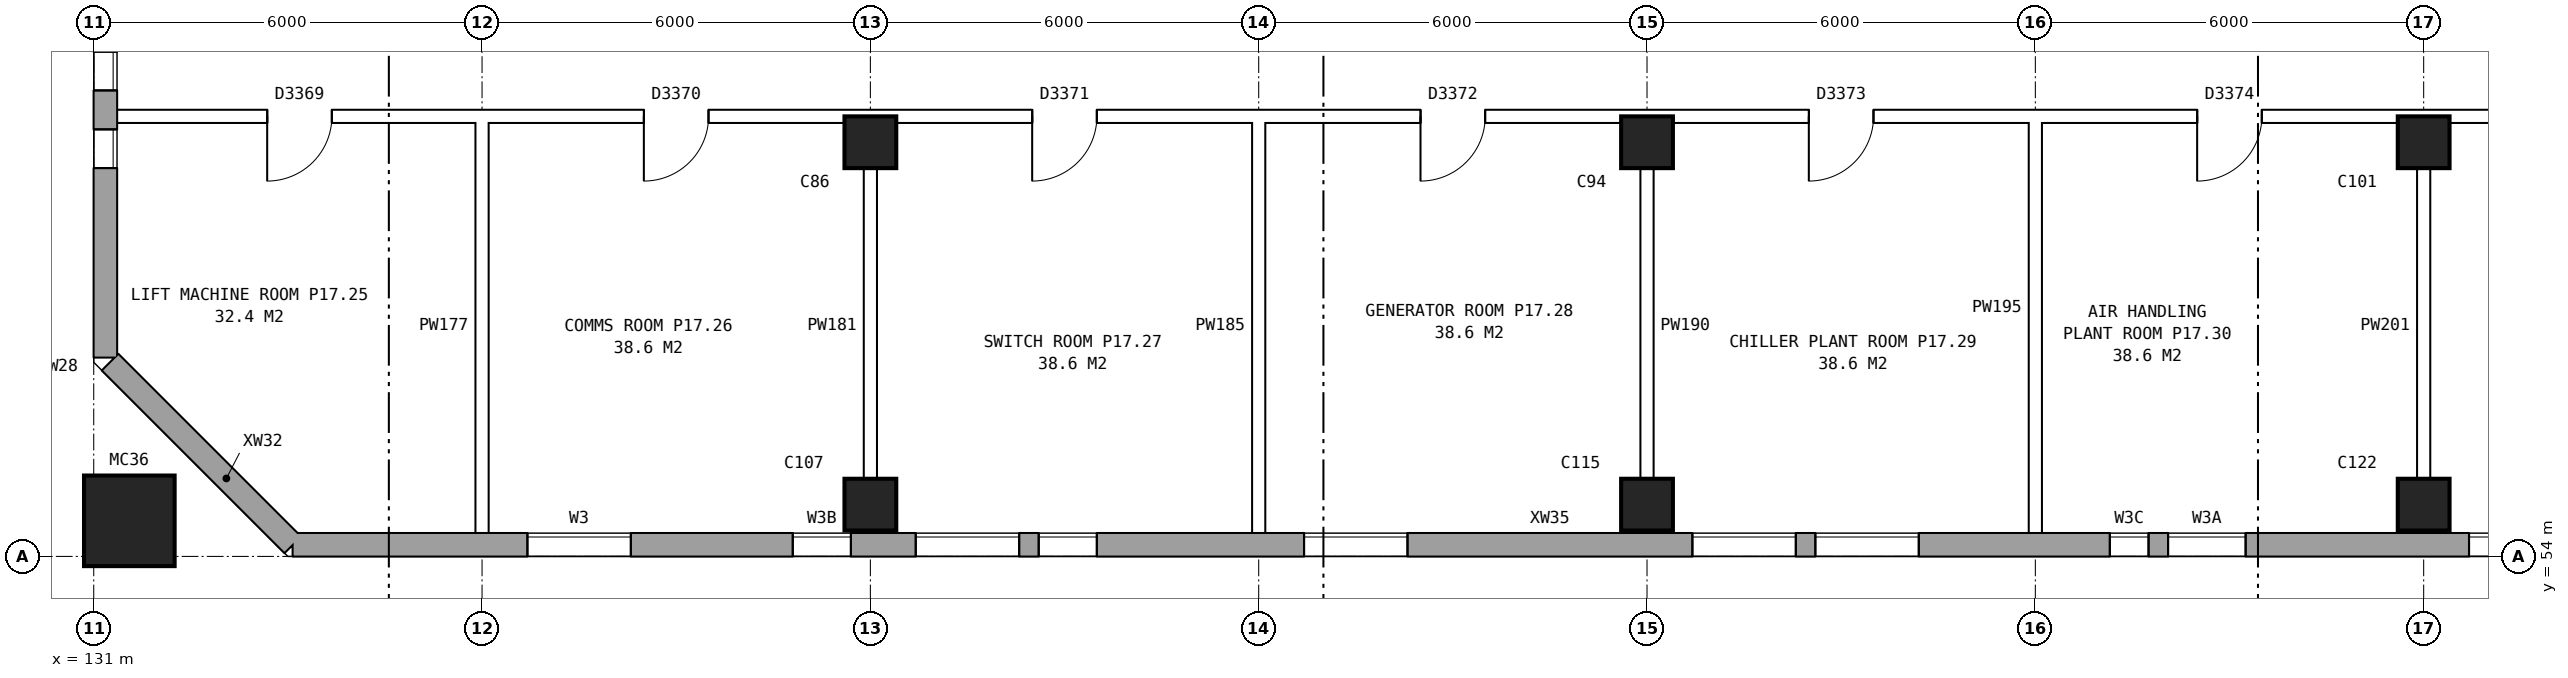
"""IFC4 building model, lengths in metres.
Left out: names, types, materials, properties, quantities, classifications, styles, units other than length and angle.
Written with IfcOpenShell. Run it as: python <this file> out.ifc"""

import sys

from ifc_helpers import new_model, si_unit, direction, frame, frame_2d, origin, origin_2d, place, context, subcontext, project, spatial, rectangle, hollow_rectangle, extrude, element, fill, save


model = new_model("IFC4")
c1 = context("Model", 3, precision=1e-05, world=origin(), true_north=direction((0.0, 1.0)))
c2 = subcontext(c1, "Body", "Model", "MODEL_VIEW")
j1 = project(units=[si_unit("LENGTHUNIT", "METRE"), si_unit("PLANEANGLEUNIT", "RADIAN")], contexts=[c1])
p1 = place(None, origin())
s1 = spatial("IfcSite", under=j1, at=p1, CompositionType="ELEMENT")
p2 = place(p1, origin())
s2 = spatial("IfcBuilding", under=s1, at=p2, CompositionType="ELEMENT")
p3 = place(p2, frame((0.0, 0.0, 62.9)))
s3 = spatial("IfcBuildingStorey", under=s2, at=p3, CompositionType="ELEMENT", Elevation=62.9)
for number, where, z_axis, x_axis in (
    (1, (143.0, 54.8, 0.0), (0.0, 0.0, 1.0), (1.0, 0.0, 0.0)),
    (2, (143.0, 60.4, 0.0), (0.0, 0.0, 1.0), (1.0, 0.0, 0.0)),
    (3, (155.0, 54.8, 0.0), (0.0, 0.0, 1.0), (1.0, 0.0, 0.0)),
    (4, (155.0, 60.4, 0.0), (0.0, 0.0, 1.0), (1.0, 0.0, 0.0)),
    (5, (167.0, 54.8, 0.0), (0.0, 0.0, 1.0), (1.0, 0.0, 0.0)),
    (6, (167.0, 60.4, 0.0), (0.0, 0.0, 1.0), (1.0, 0.0, 0.0)),
):
    element("IfcColumn", number, at=place(p3, frame(where, z_axis=z_axis, x_axis=x_axis)), inside=s3, PredefinedType="COLUMN", context=c2, shape_type="SweptSolid", body=[
        extrude(rectangle(XDim=0.8, YDim=0.8, at=origin_2d()), origin(), (0.0, 0.0, 1.0), 4.2),
    ])
p4 = place(p3, frame((131.55, 54.55, 0.0), z_axis=(0.0, 0.0, 1.0), x_axis=(1.0, 0.0, 0.0)))
e7 = element("IfcColumn", 7, at=p4, inside=s3, PredefinedType="COLUMN", context=c2, shape_type="SweptSolid", body=[
    extrude(hollow_rectangle(XDim=1.4, YDim=1.4, WallThickness=0.075, at=origin_2d()), origin(), (0.0, 0.0, 1.0), 4.5),
])
p5 = place(p3, frame((131.254, 57.001, 0.953), z_axis=(0.0, 0.0, 1.0), x_axis=(0.706994764273, -0.707218780358, 0.0)))
e8 = element("IfcWall", 8, at=p5, inside=s3, PredefinedType="STANDARD", context=c2, shape_type="SweptSolid", body=[
    extrude(rectangle(XDim=1.09, YDim=0.36, at=frame_2d((0.545, 0.0))), origin(), (0.0, 0.0, 1.0), 2.444),
])
p6 = place(p3, frame((132.024, 56.23, 0.0), z_axis=(0.0, 0.0, 1.0), x_axis=(0.707148882153, -0.707064677713, 0.0)))
e9 = element("IfcWall", 9, at=p6, inside=s3, PredefinedType="STANDARD", context=c2, shape_type="SweptSolid", body=[
    extrude(rectangle(XDim=2.899, YDim=0.36, at=frame_2d((1.45, 0.0))), origin(), (0.0, 0.0, 1.0), 4.2),
])
p7 = place(p3, frame((134.075, 54.18, 0.0), z_axis=(0.0, 0.0, 1.0), x_axis=(1.0, 0.0, 0.0)))
e10 = element("IfcWall", 10, at=p7, inside=s3, PredefinedType="STANDARD", context=c2, shape_type="SweptSolid", body=[
    extrude(rectangle(XDim=38.101, YDim=0.36, at=frame_2d((19.05, 0.0))), origin(), (0.0, 0.0, 1.0), 4.2),
])
p8 = place(p7, frame((3.625, 0.0, 1.5)))
e11 = element("IfcOpeningElement", 11, at=p8, cuts=e10, PredefinedType="OPENING", context=c2, shape_type="SweptSolid", body=[
    extrude(rectangle(XDim=1.6, YDim=1.2, at=frame_2d((0.8, 0.6))), frame((0.0, 0.19, 0.0), z_axis=(0.0, -1.0, 0.0), x_axis=(1.0, 0.0, 0.0)), (0.0, 0.0, 1.0), 0.38),
])
p9 = place(p7, frame((7.725, 0.0, 1.5)))
e12 = element("IfcOpeningElement", 12, at=p9, cuts=e10, PredefinedType="OPENING", context=c2, shape_type="SweptSolid", body=[
    extrude(rectangle(XDim=0.9, YDim=1.2, at=frame_2d((0.45, 0.6))), frame((0.0, 0.19, 0.0), z_axis=(0.0, -1.0, 0.0), x_axis=(1.0, 0.0, 0.0)), (0.0, 0.0, 1.0), 0.38),
])
p10 = place(p7, frame((9.625, 0.0, 1.5)))
e13 = element("IfcOpeningElement", 13, at=p10, cuts=e10, PredefinedType="OPENING", context=c2, shape_type="SweptSolid", body=[
    extrude(rectangle(XDim=1.6, YDim=1.2, at=frame_2d((0.8, 0.6))), frame((0.0, 0.19, 0.0), z_axis=(0.0, -1.0, 0.0), x_axis=(1.0, 0.0, 0.0)), (0.0, 0.0, 1.0), 0.38),
])
p11 = place(p7, frame((11.525, 0.0, 1.5)))
e14 = element("IfcOpeningElement", 14, at=p11, cuts=e10, PredefinedType="OPENING", context=c2, shape_type="SweptSolid", body=[
    extrude(rectangle(XDim=0.9, YDim=1.2, at=frame_2d((0.45, 0.6))), frame((0.0, 0.19, 0.0), z_axis=(0.0, -1.0, 0.0), x_axis=(1.0, 0.0, 0.0)), (0.0, 0.0, 1.0), 0.38),
])
p12 = place(p7, frame((15.625, 0.0, 1.5)))
e15 = element("IfcOpeningElement", 15, at=p12, cuts=e10, PredefinedType="OPENING", context=c2, shape_type="SweptSolid", body=[
    extrude(rectangle(XDim=1.6, YDim=1.2, at=frame_2d((0.8, 0.6))), frame((0.0, 0.19, 0.0), z_axis=(0.0, -1.0, 0.0), x_axis=(1.0, 0.0, 0.0)), (0.0, 0.0, 1.0), 0.38),
])
p13 = place(p7, frame((21.625, 0.0, 1.5)))
e16 = element("IfcOpeningElement", 16, at=p13, cuts=e10, PredefinedType="OPENING", context=c2, shape_type="SweptSolid", body=[
    extrude(rectangle(XDim=1.6, YDim=1.2, at=frame_2d((0.8, 0.6))), frame((0.0, 0.19, 0.0), z_axis=(0.0, -1.0, 0.0), x_axis=(1.0, 0.0, 0.0)), (0.0, 0.0, 1.0), 0.38),
])
p14 = place(p7, frame((23.525, 0.0, 1.5)))
e17 = element("IfcOpeningElement", 17, at=p14, cuts=e10, PredefinedType="OPENING", context=c2, shape_type="SweptSolid", body=[
    extrude(rectangle(XDim=1.6, YDim=1.2, at=frame_2d((0.8, 0.6))), frame((0.0, 0.19, 0.0), z_axis=(0.0, -1.0, 0.0), x_axis=(1.0, 0.0, 0.0)), (0.0, 0.0, 1.0), 0.38),
])
p15 = place(p7, frame((28.075, 0.0, 1.5)))
e18 = element("IfcOpeningElement", 18, at=p15, cuts=e10, PredefinedType="OPENING", context=c2, shape_type="SweptSolid", body=[
    extrude(rectangle(XDim=0.6, YDim=1.2, at=frame_2d((0.3, 0.6))), frame((0.0, 0.19, 0.0), z_axis=(0.0, -1.0, 0.0), x_axis=(1.0, 0.0, 0.0)), (0.0, 0.0, 1.0), 0.38),
])
p16 = place(p7, frame((28.975, 0.0, 1.5)))
e19 = element("IfcOpeningElement", 19, at=p16, cuts=e10, PredefinedType="OPENING", context=c2, shape_type="SweptSolid", body=[
    extrude(rectangle(XDim=1.2, YDim=1.2, at=frame_2d((0.6, 0.6))), frame((0.0, 0.19, 0.0), z_axis=(0.0, -1.0, 0.0), x_axis=(1.0, 0.0, 0.0)), (0.0, 0.0, 1.0), 0.38),
])
p17 = place(p7, frame((33.625, 0.0, 1.5)))
e20 = element("IfcOpeningElement", 20, at=p17, cuts=e10, PredefinedType="OPENING", context=c2, shape_type="SweptSolid", body=[
    extrude(rectangle(XDim=1.6, YDim=1.2, at=frame_2d((0.8, 0.6))), frame((0.0, 0.19, 0.0), z_axis=(0.0, -1.0, 0.0), x_axis=(1.0, 0.0, 0.0)), (0.0, 0.0, 1.0), 0.38),
])
p18 = place(p3, frame((131.18, 82.925, 0.0), z_axis=(0.0, 0.0, 1.0), x_axis=(0.0, -1.0, 0.0)))
e21 = element("IfcWall", 21, at=p18, inside=s3, PredefinedType="STANDARD", context=c2, shape_type="SweptSolid", body=[
    extrude(rectangle(XDim=25.851, YDim=0.36, at=frame_2d((12.925, 0.0))), origin(), (0.0, 0.0, 1.0), 4.2),
])
p19 = place(p18, frame((2.9, 0.0, 1.5)))
e22 = element("IfcOpeningElement", 22, at=p19, cuts=e21, PredefinedType="OPENING", context=c2, shape_type="SweptSolid", body=[
    extrude(rectangle(XDim=0.6, YDim=1.2, at=frame_2d((0.3, 0.6))), frame((0.0, 0.19, 0.0), z_axis=(0.0, -1.0, 0.0), x_axis=(1.0, 0.0, 0.0)), (0.0, 0.0, 1.0), 0.38),
])
p20 = place(p18, frame((4.625, 0.0, 1.5)))
e23 = element("IfcOpeningElement", 23, at=p20, cuts=e21, PredefinedType="OPENING", context=c2, shape_type="SweptSolid", body=[
    extrude(rectangle(XDim=1.6, YDim=1.2, at=frame_2d((0.8, 0.6))), frame((0.0, 0.19, 0.0), z_axis=(0.0, -1.0, 0.0), x_axis=(1.0, 0.0, 0.0)), (0.0, 0.0, 1.0), 0.38),
])
p21 = place(p18, frame((21.125, 0.0, 1.5)))
e24 = element("IfcOpeningElement", 24, at=p21, cuts=e21, PredefinedType="OPENING", context=c2, shape_type="SweptSolid", body=[
    extrude(rectangle(XDim=0.6, YDim=1.2, at=frame_2d((0.3, 0.6))), frame((0.0, 0.19, 0.0), z_axis=(0.0, -1.0, 0.0), x_axis=(1.0, 0.0, 0.0)), (0.0, 0.0, 1.0), 0.38),
])
p22 = place(p18, frame((22.325, 0.0, 1.5)))
e25 = element("IfcOpeningElement", 25, at=p22, cuts=e21, PredefinedType="OPENING", context=c2, shape_type="SweptSolid", body=[
    extrude(rectangle(XDim=0.6, YDim=1.2, at=frame_2d((0.3, 0.6))), frame((0.0, 0.19, 0.0), z_axis=(0.0, -1.0, 0.0), x_axis=(1.0, 0.0, 0.0)), (0.0, 0.0, 1.0), 0.38),
])
p23 = place(p3, frame((131.24, 60.8, 0.0), z_axis=(0.0, 0.0, 1.0), x_axis=(1.0, 0.0, 0.0)))
e26 = element("IfcWall", 26, at=p23, inside=s3, PredefinedType="PARTITIONING", context=c2, shape_type="SweptSolid", body=[
    extrude(rectangle(XDim=43.77, YDim=0.2, at=frame_2d((21.885, 0.0))), origin(), (0.0, 0.0, 1.0), 4.2),
])
p24 = place(p23, frame((2.44, 0.0, 0.0)))
e27 = element("IfcOpeningElement", 27, at=p24, cuts=e26, PredefinedType="OPENING", context=c2, shape_type="SweptSolid", body=[
    extrude(rectangle(XDim=1.0, YDim=2.1, at=frame_2d((0.5, 1.05))), frame((0.0, 0.11, 0.0), z_axis=(0.0, -1.0, 0.0), x_axis=(1.0, 0.0, 0.0)), (0.0, 0.0, 1.0), 0.22),
])
p25 = place(p23, frame((8.26, 0.0, 0.0)))
e28 = element("IfcOpeningElement", 28, at=p25, cuts=e26, PredefinedType="OPENING", context=c2, shape_type="SweptSolid", body=[
    extrude(rectangle(XDim=1.0, YDim=2.1, at=frame_2d((0.5, 1.05))), frame((0.0, 0.11, 0.0), z_axis=(0.0, -1.0, 0.0), x_axis=(1.0, 0.0, 0.0)), (0.0, 0.0, 1.0), 0.22),
])
p26 = place(p23, frame((14.26, 0.0, 0.0)))
e29 = element("IfcOpeningElement", 29, at=p26, cuts=e26, PredefinedType="OPENING", context=c2, shape_type="SweptSolid", body=[
    extrude(rectangle(XDim=1.0, YDim=2.1, at=frame_2d((0.5, 1.05))), frame((0.0, 0.11, 0.0), z_axis=(0.0, -1.0, 0.0), x_axis=(1.0, 0.0, 0.0)), (0.0, 0.0, 1.0), 0.22),
])
p27 = place(p23, frame((20.26, 0.0, 0.0)))
e30 = element("IfcOpeningElement", 30, at=p27, cuts=e26, PredefinedType="OPENING", context=c2, shape_type="SweptSolid", body=[
    extrude(rectangle(XDim=1.0, YDim=2.1, at=frame_2d((0.5, 1.05))), frame((0.0, 0.11, 0.0), z_axis=(0.0, -1.0, 0.0), x_axis=(1.0, 0.0, 0.0)), (0.0, 0.0, 1.0), 0.22),
])
p28 = place(p23, frame((26.26, 0.0, 0.0)))
e31 = element("IfcOpeningElement", 31, at=p28, cuts=e26, PredefinedType="OPENING", context=c2, shape_type="SweptSolid", body=[
    extrude(rectangle(XDim=1.0, YDim=2.1, at=frame_2d((0.5, 1.05))), frame((0.0, 0.11, 0.0), z_axis=(0.0, -1.0, 0.0), x_axis=(1.0, 0.0, 0.0)), (0.0, 0.0, 1.0), 0.22),
])
p29 = place(p23, frame((32.26, 0.0, 0.0)))
e32 = element("IfcOpeningElement", 32, at=p29, cuts=e26, PredefinedType="OPENING", context=c2, shape_type="SweptSolid", body=[
    extrude(rectangle(XDim=1.0, YDim=2.1, at=frame_2d((0.5, 1.05))), frame((0.0, 0.11, 0.0), z_axis=(0.0, -1.0, 0.0), x_axis=(1.0, 0.0, 0.0)), (0.0, 0.0, 1.0), 0.22),
])
p30 = place(p23, frame((41.505, 0.0, 0.0)))
e33 = element("IfcOpeningElement", 33, at=p30, cuts=e26, PredefinedType="OPENING", context=c2, shape_type="SweptSolid", body=[
    extrude(rectangle(XDim=1.0, YDim=2.1, at=frame_2d((0.5, 1.05))), frame((0.0, 0.11, 0.0), z_axis=(0.0, -1.0, 0.0), x_axis=(1.0, 0.0, 0.0)), (0.0, 0.0, 1.0), 0.22),
])
for number, where, z_axis, x_axis in (
    (34, (137.0, 54.24, 0.0), (0.0, 0.0, 1.0), (0.0, 1.0, 0.0)),
    (35, (143.0, 54.24, 0.0), (0.0, 0.0, 1.0), (0.0, 1.0, 0.0)),
    (36, (149.0, 54.24, 0.0), (0.0, 0.0, 1.0), (0.0, 1.0, 0.0)),
    (37, (155.0, 54.24, 0.0), (0.0, 0.0, 1.0), (0.0, 1.0, 0.0)),
    (38, (161.0, 54.24, 0.0), (0.0, 0.0, 1.0), (0.0, 1.0, 0.0)),
    (39, (167.0, 54.24, 0.0), (0.0, 0.0, 1.0), (0.0, 1.0, 0.0)),
):
    element("IfcWall", number, at=place(p3, frame(where, z_axis=z_axis, x_axis=x_axis)), inside=s3, PredefinedType="PARTITIONING", context=c2, shape_type="SweptSolid", body=[
        extrude(rectangle(XDim=6.66, YDim=0.2, at=frame_2d((3.33, 0.0))), origin(), (0.0, 0.0, 1.0), 4.2),
    ])
p31 = place(p8, origin())
e40 = element("IfcWindow", 40, at=p31, inside=s3, PartitioningType="DOUBLE_PANEL_HORIZONTAL", PredefinedType="WINDOW", context=c2, shape_type="SweptSolid", body=[
    extrude(rectangle(XDim=1.6, YDim=1.2, at=frame_2d((0.8, 0.6))), frame((0.0, 0.15, 0.0), z_axis=(0.0, -1.0, 0.0), x_axis=(1.0, 0.0, 0.0)), (0.0, 0.0, 1.0), 0.06),
])
fill(e11, e40)
p32 = place(p9, origin())
e41 = element("IfcWindow", 41, at=p32, inside=s3, PartitioningType="DOUBLE_PANEL_HORIZONTAL", PredefinedType="WINDOW", context=c2, shape_type="SweptSolid", body=[
    extrude(rectangle(XDim=0.9, YDim=1.2, at=frame_2d((0.45, 0.6))), frame((0.0, 0.15, 0.0), z_axis=(0.0, -1.0, 0.0), x_axis=(1.0, 0.0, 0.0)), (0.0, 0.0, 1.0), 0.06),
])
fill(e12, e41)
p33 = place(p10, origin())
e42 = element("IfcWindow", 42, at=p33, inside=s3, PartitioningType="DOUBLE_PANEL_HORIZONTAL", PredefinedType="WINDOW", context=c2, shape_type="SweptSolid", body=[
    extrude(rectangle(XDim=1.6, YDim=1.2, at=frame_2d((0.8, 0.6))), frame((0.0, 0.15, 0.0), z_axis=(0.0, -1.0, 0.0), x_axis=(1.0, 0.0, 0.0)), (0.0, 0.0, 1.0), 0.06),
])
fill(e13, e42)
p34 = place(p11, origin())
e43 = element("IfcWindow", 43, at=p34, inside=s3, PartitioningType="DOUBLE_PANEL_HORIZONTAL", PredefinedType="WINDOW", context=c2, shape_type="SweptSolid", body=[
    extrude(rectangle(XDim=0.9, YDim=1.2, at=frame_2d((0.45, 0.6))), frame((0.0, 0.15, 0.0), z_axis=(0.0, -1.0, 0.0), x_axis=(1.0, 0.0, 0.0)), (0.0, 0.0, 1.0), 0.06),
])
fill(e14, e43)
p35 = place(p12, origin())
e44 = element("IfcWindow", 44, at=p35, inside=s3, PartitioningType="DOUBLE_PANEL_HORIZONTAL", PredefinedType="WINDOW", context=c2, shape_type="SweptSolid", body=[
    extrude(rectangle(XDim=1.6, YDim=1.2, at=frame_2d((0.8, 0.6))), frame((0.0, 0.15, 0.0), z_axis=(0.0, -1.0, 0.0), x_axis=(1.0, 0.0, 0.0)), (0.0, 0.0, 1.0), 0.06),
])
fill(e15, e44)
p36 = place(p13, origin())
e45 = element("IfcWindow", 45, at=p36, inside=s3, PartitioningType="DOUBLE_PANEL_HORIZONTAL", PredefinedType="WINDOW", context=c2, shape_type="SweptSolid", body=[
    extrude(rectangle(XDim=1.6, YDim=1.2, at=frame_2d((0.8, 0.6))), frame((0.0, 0.15, 0.0), z_axis=(0.0, -1.0, 0.0), x_axis=(1.0, 0.0, 0.0)), (0.0, 0.0, 1.0), 0.06),
])
fill(e16, e45)
p37 = place(p14, origin())
e46 = element("IfcWindow", 46, at=p37, inside=s3, PartitioningType="DOUBLE_PANEL_HORIZONTAL", PredefinedType="WINDOW", context=c2, shape_type="SweptSolid", body=[
    extrude(rectangle(XDim=1.6, YDim=1.2, at=frame_2d((0.8, 0.6))), frame((0.0, 0.15, 0.0), z_axis=(0.0, -1.0, 0.0), x_axis=(1.0, 0.0, 0.0)), (0.0, 0.0, 1.0), 0.06),
])
fill(e17, e46)
p38 = place(p15, origin())
e47 = element("IfcWindow", 47, at=p38, inside=s3, PartitioningType="DOUBLE_PANEL_HORIZONTAL", PredefinedType="WINDOW", context=c2, shape_type="SweptSolid", body=[
    extrude(rectangle(XDim=0.6, YDim=1.2, at=frame_2d((0.3, 0.6))), frame((0.0, 0.15, 0.0), z_axis=(0.0, -1.0, 0.0), x_axis=(1.0, 0.0, 0.0)), (0.0, 0.0, 1.0), 0.06),
])
fill(e18, e47)
p39 = place(p16, origin())
e48 = element("IfcWindow", 48, at=p39, inside=s3, PartitioningType="DOUBLE_PANEL_HORIZONTAL", PredefinedType="WINDOW", context=c2, shape_type="SweptSolid", body=[
    extrude(rectangle(XDim=1.2, YDim=1.2, at=frame_2d((0.6, 0.6))), frame((0.0, 0.15, 0.0), z_axis=(0.0, -1.0, 0.0), x_axis=(1.0, 0.0, 0.0)), (0.0, 0.0, 1.0), 0.06),
])
fill(e19, e48)
p40 = place(p17, origin())
e49 = element("IfcWindow", 49, at=p40, inside=s3, PartitioningType="DOUBLE_PANEL_HORIZONTAL", PredefinedType="WINDOW", context=c2, shape_type="SweptSolid", body=[
    extrude(rectangle(XDim=1.6, YDim=1.2, at=frame_2d((0.8, 0.6))), frame((0.0, 0.15, 0.0), z_axis=(0.0, -1.0, 0.0), x_axis=(1.0, 0.0, 0.0)), (0.0, 0.0, 1.0), 0.06),
])
fill(e20, e49)
p41 = place(p21, origin())
e50 = element("IfcWindow", 50, at=p41, inside=s3, PartitioningType="DOUBLE_PANEL_HORIZONTAL", PredefinedType="WINDOW", context=c2, shape_type="SweptSolid", body=[
    extrude(rectangle(XDim=0.6, YDim=1.2, at=frame_2d((0.3, 0.6))), frame((0.0, 0.15, 0.0), z_axis=(0.0, -1.0, 0.0), x_axis=(1.0, 0.0, 0.0)), (0.0, 0.0, 1.0), 0.06),
])
fill(e24, e50)
p42 = place(p22, origin())
e51 = element("IfcWindow", 51, at=p42, inside=s3, PartitioningType="DOUBLE_PANEL_HORIZONTAL", PredefinedType="WINDOW", context=c2, shape_type="SweptSolid", body=[
    extrude(rectangle(XDim=0.6, YDim=1.2, at=frame_2d((0.3, 0.6))), frame((0.0, 0.15, 0.0), z_axis=(0.0, -1.0, 0.0), x_axis=(1.0, 0.0, 0.0)), (0.0, 0.0, 1.0), 0.06),
])
fill(e25, e51)
p43 = place(p24, frame((1.0, 0.0, 0.0), z_axis=(0.0, 0.0, 1.0), x_axis=(-1.0, 0.0, 0.0)))
e52 = element("IfcDoor", 52, at=p43, inside=s3, OperationType="SINGLE_SWING_RIGHT", PredefinedType="DOOR", context=c2, shape_type="SweptSolid", body=[
    extrude(rectangle(XDim=1.0, YDim=2.1, at=frame_2d((0.5, 1.05))), frame((0.0, 0.025, 0.0), z_axis=(0.0, -1.0, 0.0), x_axis=(1.0, 0.0, 0.0)), (0.0, 0.0, 1.0), 0.05),
])
fill(e27, e52)
p44 = place(p25, frame((1.0, 0.0, 0.0), z_axis=(0.0, 0.0, 1.0), x_axis=(-1.0, 0.0, 0.0)))
e53 = element("IfcDoor", 53, at=p44, inside=s3, OperationType="SINGLE_SWING_RIGHT", PredefinedType="DOOR", context=c2, shape_type="SweptSolid", body=[
    extrude(rectangle(XDim=1.0, YDim=2.1, at=frame_2d((0.5, 1.05))), frame((0.0, 0.025, 0.0), z_axis=(0.0, -1.0, 0.0), x_axis=(1.0, 0.0, 0.0)), (0.0, 0.0, 1.0), 0.05),
])
fill(e28, e53)
p45 = place(p26, frame((1.0, 0.0, 0.0), z_axis=(0.0, 0.0, 1.0), x_axis=(-1.0, 0.0, 0.0)))
e54 = element("IfcDoor", 54, at=p45, inside=s3, OperationType="SINGLE_SWING_RIGHT", PredefinedType="DOOR", context=c2, shape_type="SweptSolid", body=[
    extrude(rectangle(XDim=1.0, YDim=2.1, at=frame_2d((0.5, 1.05))), frame((0.0, 0.025, 0.0), z_axis=(0.0, -1.0, 0.0), x_axis=(1.0, 0.0, 0.0)), (0.0, 0.0, 1.0), 0.05),
])
fill(e29, e54)
p46 = place(p27, frame((1.0, 0.0, 0.0), z_axis=(0.0, 0.0, 1.0), x_axis=(-1.0, 0.0, 0.0)))
e55 = element("IfcDoor", 55, at=p46, inside=s3, OperationType="SINGLE_SWING_RIGHT", PredefinedType="DOOR", context=c2, shape_type="SweptSolid", body=[
    extrude(rectangle(XDim=1.0, YDim=2.1, at=frame_2d((0.5, 1.05))), frame((0.0, 0.025, 0.0), z_axis=(0.0, -1.0, 0.0), x_axis=(1.0, 0.0, 0.0)), (0.0, 0.0, 1.0), 0.05),
])
fill(e30, e55)
p47 = place(p28, frame((1.0, 0.0, 0.0), z_axis=(0.0, 0.0, 1.0), x_axis=(-1.0, 0.0, 0.0)))
e56 = element("IfcDoor", 56, at=p47, inside=s3, OperationType="SINGLE_SWING_RIGHT", PredefinedType="DOOR", context=c2, shape_type="SweptSolid", body=[
    extrude(rectangle(XDim=1.0, YDim=2.1, at=frame_2d((0.5, 1.05))), frame((0.0, 0.025, 0.0), z_axis=(0.0, -1.0, 0.0), x_axis=(1.0, 0.0, 0.0)), (0.0, 0.0, 1.0), 0.05),
])
fill(e31, e56)
p48 = place(p29, frame((1.0, 0.0, 0.0), z_axis=(0.0, 0.0, 1.0), x_axis=(-1.0, 0.0, 0.0)))
e57 = element("IfcDoor", 57, at=p48, inside=s3, OperationType="SINGLE_SWING_RIGHT", PredefinedType="DOOR", context=c2, shape_type="SweptSolid", body=[
    extrude(rectangle(XDim=1.0, YDim=2.1, at=frame_2d((0.5, 1.05))), frame((0.0, 0.025, 0.0), z_axis=(0.0, -1.0, 0.0), x_axis=(1.0, 0.0, 0.0)), (0.0, 0.0, 1.0), 0.05),
])
fill(e32, e57)
save(model, sys.argv[1])
